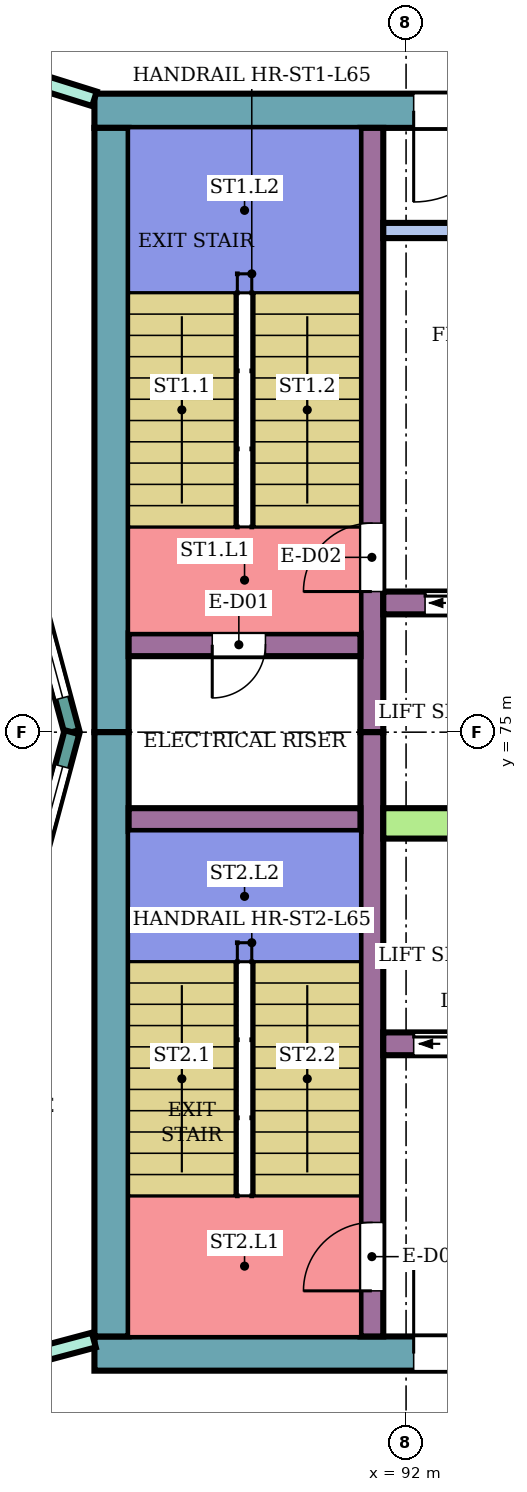
"""IFC4 building model, lengths in metres.
Left out: names, types, materials, properties, quantities, classifications, styles, units other than length and angle.
Written with IfcOpenShell. Run it as: python <this file> out.ifc"""

import sys

from ifc_helpers import new_model, si_unit, direction, frame, frame_2d, origin, place, context, subcontext, project, spatial, rectangle, extrude, element, fill, save


model = new_model("IFC4")
c1 = context("Model", 3, precision=1e-05, world=origin(), true_north=direction((0.0, 1.0)))
c2 = subcontext(c1, "Body", "Model", "MODEL_VIEW")
j1 = project(units=[si_unit("LENGTHUNIT", "METRE"), si_unit("PLANEANGLEUNIT", "RADIAN")], contexts=[c1])
p1 = place(None, origin())
s1 = spatial("IfcSite", under=j1, at=p1, CompositionType="ELEMENT")
p2 = place(p1, origin())
s2 = spatial("IfcBuilding", under=s1, at=p2, CompositionType="ELEMENT")
p3 = place(p2, frame((0.0, 0.0, 284.1)))
s3 = spatial("IfcBuildingStorey", under=s2, at=p3, CompositionType="ELEMENT", Elevation=284.1)
p4 = place(p3, frame((87.9, 83.175, 0.0), z_axis=(0.0, 0.0, 1.0), x_axis=(1.0, 0.0, 0.0)))
e1 = element("IfcWall", 1, at=p4, inside=s3, PredefinedType="SHEAR", context=c2, shape_type="SweptSolid", body=[
    extrude(rectangle(XDim=13.55, YDim=0.45, at=frame_2d((6.775, 0.0))), origin(), (0.0, 0.0, 1.0), 3.88),
])
p5 = place(p4, frame((4.2, 0.0, 0.0)))
e2 = element("IfcOpeningElement", 2, at=p5, cuts=e1, PredefinedType="OPENING", context=c2, shape_type="SweptSolid", body=[
    extrude(rectangle(XDim=2.4, YDim=2.4, at=frame_2d((1.2, 1.2))), frame((0.0, 0.235, 0.0), z_axis=(0.0, -1.0, 0.0), x_axis=(1.0, 0.0, 0.0)), (0.0, 0.0, 1.0), 0.47),
])
p6 = place(p3, frame((87.9, 66.825, 0.0), z_axis=(0.0, 0.0, 1.0), x_axis=(1.0, 0.0, 0.0)))
e3 = element("IfcWall", 3, at=p6, inside=s3, PredefinedType="SHEAR", context=c2, shape_type="SweptSolid", body=[
    extrude(rectangle(XDim=13.55, YDim=0.45, at=frame_2d((6.775, 0.0))), origin(), (0.0, 0.0, 1.0), 3.88),
])
p7 = place(p6, frame((4.2, 0.0, 0.0)))
e4 = element("IfcOpeningElement", 4, at=p7, cuts=e3, PredefinedType="OPENING", context=c2, shape_type="SweptSolid", body=[
    extrude(rectangle(XDim=2.4, YDim=2.4, at=frame_2d((1.2, 1.2))), frame((0.0, 0.235, 0.0), z_axis=(0.0, -1.0, 0.0), x_axis=(1.0, 0.0, 0.0)), (0.0, 0.0, 1.0), 0.47),
])
for number, where, z_axis, x_axis in (
    (5, (88.125, 75.0, 0.0), (0.0, 0.0, 1.0), (0.0, 1.0, 0.0)),
    (6, (88.125, 67.05, 0.0), (0.0, 0.0, 1.0), (0.0, 1.0, 0.0)),
):
    element("IfcWall", number, at=place(p3, frame(where, z_axis=z_axis, x_axis=x_axis)), inside=s3, PredefinedType="SHEAR", context=c2, shape_type="SweptSolid", body=[
        extrude(rectangle(XDim=7.95, YDim=0.45, at=frame_2d((3.975, 0.0))), origin(), (0.0, 0.0, 1.0), 3.88),
    ])
p8 = place(p3, frame((91.55, 75.0, 0.0), z_axis=(0.0, 0.0, 1.0), x_axis=(0.0, 1.0, 0.0)))
e7 = element("IfcWall", 7, at=p8, inside=s3, PredefinedType="SHEAR", context=c2, shape_type="SweptSolid", body=[
    extrude(rectangle(XDim=7.95, YDim=0.3, at=frame_2d((3.975, 0.0))), origin(), (0.0, 0.0, 1.0), 3.88),
])
p9 = place(p8, frame((1.85, 0.0, 0.0)))
e8 = element("IfcOpeningElement", 8, at=p9, cuts=e7, PredefinedType="OPENING", context=c2, shape_type="SweptSolid", body=[
    extrude(rectangle(XDim=0.9, YDim=2.1, at=frame_2d((0.45, 1.05))), frame((0.0, 0.16, 0.0), z_axis=(0.0, -1.0, 0.0), x_axis=(1.0, 0.0, 0.0)), (0.0, 0.0, 1.0), 0.32),
])
p10 = place(p3, frame((91.55, 67.05, 0.0), z_axis=(0.0, 0.0, 1.0), x_axis=(0.0, 1.0, 0.0)))
e9 = element("IfcWall", 9, at=p10, inside=s3, PredefinedType="SHEAR", context=c2, shape_type="SweptSolid", body=[
    extrude(rectangle(XDim=7.95, YDim=0.3, at=frame_2d((3.975, 0.0))), origin(), (0.0, 0.0, 1.0), 3.88),
])
p11 = place(p10, frame((0.6, 0.0, 0.0)))
e10 = element("IfcOpeningElement", 10, at=p11, cuts=e9, PredefinedType="OPENING", context=c2, shape_type="SweptSolid", body=[
    extrude(rectangle(XDim=0.9, YDim=2.1, at=frame_2d((0.45, 1.05))), frame((0.0, 0.16, 0.0), z_axis=(0.0, -1.0, 0.0), x_axis=(1.0, 0.0, 0.0)), (0.0, 0.0, 1.0), 0.32),
])
p12 = place(p3, frame((88.35, 76.15, 0.0), z_axis=(0.0, 0.0, 1.0), x_axis=(1.0, 0.0, 0.0)))
e11 = element("IfcWall", 11, at=p12, inside=s3, PredefinedType="SHEAR", context=c2, shape_type="SweptSolid", body=[
    extrude(rectangle(XDim=3.05, YDim=0.3, at=frame_2d((1.525, 0.0))), origin(), (0.0, 0.0, 1.0), 3.88),
])
p13 = place(p12, frame((1.1, 0.0, 0.0)))
e12 = element("IfcOpeningElement", 12, at=p13, cuts=e11, PredefinedType="OPENING", context=c2, shape_type="SweptSolid", body=[
    extrude(rectangle(XDim=0.7, YDim=2.0, at=frame_2d((0.35, 1.0))), frame((0.0, 0.16, 0.0), z_axis=(0.0, -1.0, 0.0), x_axis=(1.0, 0.0, 0.0)), (0.0, 0.0, 1.0), 0.32),
])
p14 = place(p3, frame((88.35, 73.85, 0.0), z_axis=(0.0, 0.0, 1.0), x_axis=(1.0, 0.0, 0.0)))
e13 = element("IfcWall", 13, at=p14, inside=s3, PredefinedType="SHEAR", context=c2, shape_type="SweptSolid", body=[
    extrude(rectangle(XDim=3.05, YDim=0.3, at=frame_2d((1.525, 0.0))), origin(), (0.0, 0.0, 1.0), 3.88),
])
p15 = place(p3, frame((91.7, 76.7, 0.0), z_axis=(0.0, 0.0, 1.0), x_axis=(1.0, 0.0, 0.0)))
e14 = element("IfcWall", 14, at=p15, inside=s3, PredefinedType="SHEAR", context=c2, shape_type="SweptSolid", body=[
    extrude(rectangle(XDim=9.75, YDim=0.3, at=frame_2d((4.875, 0.0))), origin(), (0.0, 0.0, 1.0), 3.88),
])
p16 = place(p15, frame((0.55, 0.0, 0.0)))
e15 = element("IfcOpeningElement", 15, at=p16, cuts=e14, PredefinedType="OPENING", context=c2, shape_type="SweptSolid", body=[
    extrude(rectangle(XDim=1.1, YDim=2.1, at=frame_2d((0.55, 1.05))), frame((0.0, 0.16, 0.0), z_axis=(0.0, -1.0, 0.0), x_axis=(1.0, 0.0, 0.0)), (0.0, 0.0, 1.0), 0.32),
])
p17 = place(p15, frame((3.0, 0.0, 0.0)))
e16 = element("IfcOpeningElement", 16, at=p17, cuts=e14, PredefinedType="OPENING", context=c2, shape_type="SweptSolid", body=[
    extrude(rectangle(XDim=1.2, YDim=2.1, at=frame_2d((0.6, 1.05))), frame((0.0, 0.16, 0.0), z_axis=(0.0, -1.0, 0.0), x_axis=(1.0, 0.0, 0.0)), (0.0, 0.0, 1.0), 0.32),
])
p18 = place(p15, frame((5.5, 0.0, 0.0)))
e17 = element("IfcOpeningElement", 17, at=p18, cuts=e14, PredefinedType="OPENING", context=c2, shape_type="SweptSolid", body=[
    extrude(rectangle(XDim=1.2, YDim=2.1, at=frame_2d((0.6, 1.05))), frame((0.0, 0.16, 0.0), z_axis=(0.0, -1.0, 0.0), x_axis=(1.0, 0.0, 0.0)), (0.0, 0.0, 1.0), 0.32),
])
p19 = place(p15, frame((8.175, 0.0, 0.0)))
e18 = element("IfcOpeningElement", 18, at=p19, cuts=e14, PredefinedType="OPENING", context=c2, shape_type="SweptSolid", body=[
    extrude(rectangle(XDim=0.9, YDim=2.1, at=frame_2d((0.45, 1.05))), frame((0.0, 0.16, 0.0), z_axis=(0.0, -1.0, 0.0), x_axis=(1.0, 0.0, 0.0)), (0.0, 0.0, 1.0), 0.32),
])
p20 = place(p3, frame((91.7, 73.8, 0.0), z_axis=(0.0, 0.0, 1.0), x_axis=(1.0, 0.0, 0.0)))
e19 = element("IfcWall", 19, at=p20, inside=s3, PredefinedType="SHEAR", context=c2, shape_type="SweptSolid", body=[
    extrude(rectangle(XDim=9.75, YDim=0.4, at=frame_2d((4.875, 0.0))), origin(), (0.0, 0.0, 1.0), 3.88),
])
p21 = place(p3, frame((91.7, 70.9, 0.0), z_axis=(0.0, 0.0, 1.0), x_axis=(1.0, 0.0, 0.0)))
e20 = element("IfcWall", 20, at=p21, inside=s3, PredefinedType="SHEAR", context=c2, shape_type="SweptSolid", body=[
    extrude(rectangle(XDim=9.75, YDim=0.3, at=frame_2d((4.875, 0.0))), origin(), (0.0, 0.0, 1.0), 3.88),
])
p22 = place(p21, frame((0.4, 0.0, 0.0)))
e21 = element("IfcOpeningElement", 21, at=p22, cuts=e20, PredefinedType="OPENING", context=c2, shape_type="SweptSolid", body=[
    extrude(rectangle(XDim=1.4, YDim=2.1, at=frame_2d((0.7, 1.05))), frame((0.0, 0.16, 0.0), z_axis=(0.0, -1.0, 0.0), x_axis=(1.0, 0.0, 0.0)), (0.0, 0.0, 1.0), 0.32),
])
p23 = place(p21, frame((3.0, 0.0, 0.0)))
e22 = element("IfcOpeningElement", 22, at=p23, cuts=e20, PredefinedType="OPENING", context=c2, shape_type="SweptSolid", body=[
    extrude(rectangle(XDim=1.2, YDim=2.1, at=frame_2d((0.6, 1.05))), frame((0.0, 0.16, 0.0), z_axis=(0.0, -1.0, 0.0), x_axis=(1.0, 0.0, 0.0)), (0.0, 0.0, 1.0), 0.32),
])
p24 = place(p21, frame((5.738, 0.0, 0.0)))
e23 = element("IfcOpeningElement", 23, at=p24, cuts=e20, PredefinedType="OPENING", context=c2, shape_type="SweptSolid", body=[
    extrude(rectangle(XDim=0.9, YDim=2.1, at=frame_2d((0.45, 1.05))), frame((0.0, 0.16, 0.0), z_axis=(0.0, -1.0, 0.0), x_axis=(1.0, 0.0, 0.0)), (0.0, 0.0, 1.0), 0.32),
])
p25 = place(p21, frame((8.113, 0.0, 0.0)))
e24 = element("IfcOpeningElement", 24, at=p25, cuts=e20, PredefinedType="OPENING", context=c2, shape_type="SweptSolid", body=[
    extrude(rectangle(XDim=0.9, YDim=2.1, at=frame_2d((0.45, 1.05))), frame((0.0, 0.16, 0.0), z_axis=(0.0, -1.0, 0.0), x_axis=(1.0, 0.0, 0.0)), (0.0, 0.0, 1.0), 0.32),
])
p26 = place(p3, frame((91.7, 81.6, 0.0), z_axis=(0.0, 0.0, 1.0), x_axis=(1.0, 0.0, 0.0)))
e25 = element("IfcWall", 25, at=p26, inside=s3, PredefinedType="SHEAR", context=c2, shape_type="SweptSolid", body=[
    extrude(rectangle(XDim=4.15, YDim=0.2, at=frame_2d((2.075, 0.0))), origin(), (0.0, 0.0, 1.0), 3.88),
])
p27 = place(p3, frame((87.604, 75.0, 0.0), z_axis=(0.0, 0.0, 1.0), x_axis=(-0.258789828301, 0.965933654434, 0.0)))
e26 = element("IfcWall", 26, at=p27, inside=s3, PredefinedType="NOTDEFINED", context=c2, shape_type="SweptSolid", body=[
    extrude(rectangle(XDim=3.936, YDim=0.2, at=frame_2d((1.968, 0.0))), origin(), (0.0, 0.0, 1.0), 4.2),
])
p28 = place(p27, frame((0.468, 0.0, 0.9)))
e27 = element("IfcOpeningElement", 27, at=p28, cuts=e26, PredefinedType="OPENING", context=c2, shape_type="SweptSolid", body=[
    extrude(rectangle(XDim=3.0, YDim=2.3, at=frame_2d((1.5, 1.15))), frame((0.0, 0.11, 0.0), z_axis=(0.0, -1.0, 0.0), x_axis=(1.0, 0.0, 0.0)), (0.0, 0.0, 1.0), 0.22),
])
p29 = place(p3, frame((86.585, 71.198, 0.0), z_axis=(0.0, 0.0, 1.0), x_axis=(0.258789828301, 0.965933654434, 0.0)))
e28 = element("IfcWall", 28, at=p29, inside=s3, PredefinedType="NOTDEFINED", context=c2, shape_type="SweptSolid", body=[
    extrude(rectangle(XDim=3.936, YDim=0.2, at=frame_2d((1.968, 0.0))), origin(), (0.0, 0.0, 1.0), 4.2),
])
p30 = place(p29, frame((0.468, 0.0, 0.9)))
e29 = element("IfcOpeningElement", 29, at=p30, cuts=e28, PredefinedType="OPENING", context=c2, shape_type="SweptSolid", body=[
    extrude(rectangle(XDim=3.0, YDim=2.3, at=frame_2d((1.5, 1.15))), frame((0.0, 0.11, 0.0), z_axis=(0.0, -1.0, 0.0), x_axis=(1.0, 0.0, 0.0)), (0.0, 0.0, 1.0), 0.22),
])
p31 = place(p3, frame((80.125, 64.932, 0.0), z_axis=(0.0, 0.0, 1.0), x_axis=(0.966236955806, 0.257655089674, 0.0)))
e30 = element("IfcWall", 30, at=p31, inside=s3, PredefinedType="PARTITIONING", context=c2, shape_type="SweptSolid", body=[
    extrude(rectangle(XDim=8.039, YDim=0.2, at=frame_2d((4.02, 0.0))), origin(), (0.0, 0.0, 1.0), 3.75),
])
p32 = place(p31, frame((6.298, 0.0, 0.0)))
e31 = element("IfcOpeningElement", 31, at=p32, cuts=e30, PredefinedType="OPENING", context=c2, shape_type="SweptSolid", body=[
    extrude(rectangle(XDim=0.9, YDim=2.1, at=frame_2d((0.45, 1.05))), frame((0.0, 0.11, 0.0), z_axis=(0.0, -1.0, 0.0), x_axis=(1.0, 0.0, 0.0)), (0.0, 0.0, 1.0), 0.22),
])
p33 = place(p31, frame((2.045, 0.0, 0.0)))
e32 = element("IfcOpeningElement", 32, at=p33, cuts=e30, PredefinedType="OPENING", context=c2, shape_type="SweptSolid", body=[
    extrude(rectangle(XDim=0.9, YDim=2.1, at=frame_2d((0.45, 1.05))), frame((0.0, 0.11, 0.0), z_axis=(0.0, -1.0, 0.0), x_axis=(1.0, 0.0, 0.0)), (0.0, 0.0, 1.0), 0.22),
])
p34 = place(p3, frame((85.587, 84.057, 0.0), z_axis=(0.0, 0.0, 1.0), x_axis=(0.954239513179, -0.299043393987, 0.0)))
e33 = element("IfcWall", 33, at=p34, inside=s3, PredefinedType="PARTITIONING", context=c2, shape_type="SweptSolid", body=[
    extrude(rectangle(XDim=2.424, YDim=0.2, at=frame_2d((1.212, 0.0))), origin(), (0.0, 0.0, 1.0), 3.75),
])
p35 = place(p34, frame((0.762, 0.0, 0.0)))
e34 = element("IfcOpeningElement", 34, at=p35, cuts=e33, PredefinedType="OPENING", context=c2, shape_type="SweptSolid", body=[
    extrude(rectangle(XDim=0.9, YDim=2.1, at=frame_2d((0.45, 1.05))), frame((0.0, 0.11, 0.0), z_axis=(0.0, -1.0, 0.0), x_axis=(1.0, 0.0, 0.0)), (0.0, 0.0, 1.0), 0.22),
])
p36 = place(p28, origin())
e35 = element("IfcWindow", 35, at=p36, inside=s3, PartitioningType="SINGLE_PANEL", PredefinedType="WINDOW", context=c2, shape_type="SweptSolid", body=[
    extrude(rectangle(XDim=3.0, YDim=2.3, at=frame_2d((1.5, 1.15))), frame((0.0, 0.03, 0.0), z_axis=(0.0, -1.0, 0.0), x_axis=(1.0, 0.0, 0.0)), (0.0, 0.0, 1.0), 0.06),
])
fill(e27, e35)
p37 = place(p30, origin())
e36 = element("IfcWindow", 36, at=p37, inside=s3, PartitioningType="SINGLE_PANEL", PredefinedType="WINDOW", context=c2, shape_type="SweptSolid", body=[
    extrude(rectangle(XDim=3.0, YDim=2.3, at=frame_2d((1.5, 1.15))), frame((0.0, 0.03, 0.0), z_axis=(0.0, -1.0, 0.0), x_axis=(1.0, 0.0, 0.0)), (0.0, 0.0, 1.0), 0.06),
])
fill(e29, e36)
p38 = place(p13, frame((0.7, 0.0, 0.0), z_axis=(0.0, 0.0, 1.0), x_axis=(-1.0, 0.0, 0.0)))
e37 = element("IfcDoor", 37, at=p38, inside=s3, OperationType="SINGLE_SWING_RIGHT", PredefinedType="DOOR", context=c2, shape_type="SweptSolid", body=[
    extrude(rectangle(XDim=0.7, YDim=2.0, at=frame_2d((0.35, 1.0))), frame((0.0, 0.025, 0.0), z_axis=(0.0, -1.0, 0.0), x_axis=(1.0, 0.0, 0.0)), (0.0, 0.0, 1.0), 0.05),
])
fill(e12, e37)
p39 = place(p9, origin())
e38 = element("IfcDoor", 38, at=p39, inside=s3, OperationType="SINGLE_SWING_LEFT", PredefinedType="DOOR", context=c2, shape_type="SweptSolid", body=[
    extrude(rectangle(XDim=0.9, YDim=2.1, at=frame_2d((0.45, 1.05))), frame((0.0, 0.025, 0.0), z_axis=(0.0, -1.0, 0.0), x_axis=(1.0, 0.0, 0.0)), (0.0, 0.0, 1.0), 0.05),
])
fill(e8, e38)
p40 = place(p11, origin())
e39 = element("IfcDoor", 39, at=p40, inside=s3, OperationType="SINGLE_SWING_LEFT", PredefinedType="DOOR", context=c2, shape_type="SweptSolid", body=[
    extrude(rectangle(XDim=0.9, YDim=2.1, at=frame_2d((0.45, 1.05))), frame((0.0, 0.025, 0.0), z_axis=(0.0, -1.0, 0.0), x_axis=(1.0, 0.0, 0.0)), (0.0, 0.0, 1.0), 0.05),
])
fill(e10, e39)
p41 = place(p16, origin())
e40 = element("IfcDoor", 40, at=p41, inside=s3, OperationType="DOUBLE_DOOR_SLIDING", PredefinedType="DOOR", context=c2, shape_type="SweptSolid", body=[
    extrude(rectangle(XDim=1.1, YDim=2.1, at=frame_2d((0.55, 1.05))), frame((0.0, 0.025, 0.0), z_axis=(0.0, -1.0, 0.0), x_axis=(1.0, 0.0, 0.0)), (0.0, 0.0, 1.0), 0.05),
])
fill(e15, e40)
p42 = place(p22, origin())
e41 = element("IfcDoor", 41, at=p42, inside=s3, OperationType="DOUBLE_DOOR_SLIDING", PredefinedType="DOOR", context=c2, shape_type="SweptSolid", body=[
    extrude(rectangle(XDim=1.4, YDim=2.1, at=frame_2d((0.7, 1.05))), frame((0.0, 0.025, 0.0), z_axis=(0.0, -1.0, 0.0), x_axis=(1.0, 0.0, 0.0)), (0.0, 0.0, 1.0), 0.05),
])
fill(e21, e41)
p43 = place(p5, frame((2.4, 0.0, 0.0), z_axis=(0.0, 0.0, 1.0), x_axis=(-1.0, 0.0, 0.0)))
e42 = element("IfcDoor", 42, at=p43, inside=s3, OperationType="DOUBLE_DOOR_SINGLE_SWING", PredefinedType="DOOR", context=c2, shape_type="SweptSolid", body=[
    extrude(rectangle(XDim=2.4, YDim=2.4, at=frame_2d((1.2, 1.2))), frame((0.0, 0.025, 0.0), z_axis=(0.0, -1.0, 0.0), x_axis=(1.0, 0.0, 0.0)), (0.0, 0.0, 1.0), 0.05),
])
fill(e2, e42)
p44 = place(p7, origin())
e43 = element("IfcDoor", 43, at=p44, inside=s3, OperationType="DOUBLE_DOOR_SINGLE_SWING", PredefinedType="DOOR", context=c2, shape_type="SweptSolid", body=[
    extrude(rectangle(XDim=2.4, YDim=2.4, at=frame_2d((1.2, 1.2))), frame((0.0, 0.025, 0.0), z_axis=(0.0, -1.0, 0.0), x_axis=(1.0, 0.0, 0.0)), (0.0, 0.0, 1.0), 0.05),
])
fill(e4, e43)
save(model, sys.argv[1])
